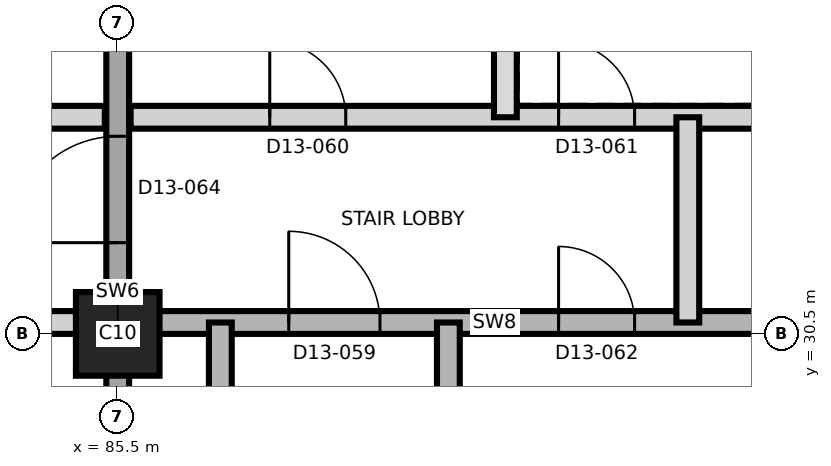
"""IFC4 building model, lengths in metres.
Left out: names, types, materials, properties, quantities, classifications, styles, units other than length and angle.
Written with IfcOpenShell. Run it as: python <this file> out.ifc"""

import sys

from ifc_helpers import new_model, si_unit, direction, frame, frame_2d, origin, origin_2d, place, context, subcontext, project, spatial, rectangle, extrude, element, fill, save


model = new_model("IFC4")
c1 = context("Model", 3, precision=1e-05, world=origin(), true_north=direction((0.0, 1.0)))
c2 = subcontext(c1, "Body", "Model", "MODEL_VIEW")
j1 = project(units=[si_unit("LENGTHUNIT", "METRE"), si_unit("PLANEANGLEUNIT", "RADIAN")], contexts=[c1])
p1 = place(None, origin())
s1 = spatial("IfcSite", under=j1, at=p1, CompositionType="ELEMENT")
p2 = place(p1, origin())
s2 = spatial("IfcBuilding", under=s1, at=p2, CompositionType="ELEMENT")
p3 = place(p2, frame((0.0, 0.0, 145.9)))
s3 = spatial("IfcBuildingStorey", under=s2, at=p3, CompositionType="ELEMENT", Elevation=145.9)
p4 = place(p3, frame((85.5, 30.5, 0.0), z_axis=(0.0, 0.0, 1.0), x_axis=(1.0, 0.0, 0.0)))
e1 = element("IfcColumn", 1, at=p4, inside=s3, PredefinedType="COLUMN", context=c2, shape_type="SweptSolid", body=[
    extrude(rectangle(XDim=1.1, YDim=1.1, at=origin_2d()), origin(), (0.0, 0.0, 1.0), 3.7),
])
p5 = place(p3, frame((85.5, 20.35, 0.0), z_axis=(0.0, 0.0, 1.0), x_axis=(0.0, 1.0, 0.0)))
e2 = element("IfcWall", 2, at=p5, inside=s3, PredefinedType="SHEAR", context=c2, shape_type="SweptSolid", body=[
    extrude(rectangle(XDim=20.3, YDim=0.3, at=frame_2d((10.15, 0.0))), origin(), (0.0, 0.0, 1.0), 3.7),
])
p6 = place(p5, frame((11.35, 0.0, 0.0)))
e3 = element("IfcOpeningElement", 3, at=p6, cuts=e2, PredefinedType="OPENING", context=c2, shape_type="SweptSolid", body=[
    extrude(rectangle(XDim=1.4, YDim=2.1, at=frame_2d((0.7, 1.05))), frame((0.0, 0.16, 0.0), z_axis=(0.0, -1.0, 0.0), x_axis=(1.0, 0.0, 0.0)), (0.0, 0.0, 1.0), 0.32),
])
p7 = place(p3, frame((58.65, 30.65, 0.0), z_axis=(0.0, 0.0, 1.0), x_axis=(1.0, 0.0, 0.0)))
e4 = element("IfcWall", 4, at=p7, inside=s3, PredefinedType="PARTITIONING", context=c2, shape_type="SweptSolid", body=[
    extrude(rectangle(XDim=26.68, YDim=0.3, at=frame_2d((13.34, 0.0))), origin(), (0.0, 0.0, 1.0), 3.3),
])
p8 = place(p7, frame((2.2, 0.0, 0.0)))
e5 = element("IfcOpeningElement", 5, at=p8, cuts=e4, PredefinedType="OPENING", context=c2, shape_type="SweptSolid", body=[
    extrude(rectangle(XDim=1.0, YDim=2.4, at=frame_2d((0.5, 1.2))), frame((0.0, 0.16, 0.0), z_axis=(0.0, -1.0, 0.0), x_axis=(1.0, 0.0, 0.0)), (0.0, 0.0, 1.0), 0.32),
])
p9 = place(p7, frame((12.85, 0.0, 0.0)))
e6 = element("IfcOpeningElement", 6, at=p9, cuts=e4, PredefinedType="OPENING", context=c2, shape_type="SweptSolid", body=[
    extrude(rectangle(XDim=1.0, YDim=2.4, at=frame_2d((0.5, 1.2))), frame((0.0, 0.16, 0.0), z_axis=(0.0, -1.0, 0.0), x_axis=(1.0, 0.0, 0.0)), (0.0, 0.0, 1.0), 0.32),
])
p10 = place(p7, frame((20.77, 0.0, 0.0)))
e7 = element("IfcOpeningElement", 7, at=p10, cuts=e4, PredefinedType="OPENING", context=c2, shape_type="SweptSolid", body=[
    extrude(rectangle(XDim=1.0, YDim=2.1, at=frame_2d((0.5, 1.05))), frame((0.0, 0.16, 0.0), z_axis=(0.0, -1.0, 0.0), x_axis=(1.0, 0.0, 0.0)), (0.0, 0.0, 1.0), 0.32),
])
p11 = place(p7, frame((22.57, 0.0, 0.0)))
e8 = element("IfcOpeningElement", 8, at=p11, cuts=e4, PredefinedType="OPENING", context=c2, shape_type="SweptSolid", body=[
    extrude(rectangle(XDim=1.0, YDim=2.1, at=frame_2d((0.5, 1.05))), frame((0.0, 0.16, 0.0), z_axis=(0.0, -1.0, 0.0), x_axis=(1.0, 0.0, 0.0)), (0.0, 0.0, 1.0), 0.32),
])
p12 = place(p3, frame((85.67, 30.65, 0.0), z_axis=(0.0, 0.0, 1.0), x_axis=(1.0, 0.0, 0.0)))
e9 = element("IfcWall", 9, at=p12, inside=s3, PredefinedType="SHEAR", context=c2, shape_type="SweptSolid", body=[
    extrude(rectangle(XDim=9.58, YDim=0.3, at=frame_2d((4.79, 0.0))), origin(), (0.0, 0.0, 1.0), 3.4),
])
p13 = place(p12, frame((2.08, 0.0, 0.0)))
e10 = element("IfcOpeningElement", 10, at=p13, cuts=e9, PredefinedType="OPENING", context=c2, shape_type="SweptSolid", body=[
    extrude(rectangle(XDim=1.2, YDim=2.1, at=frame_2d((0.6, 1.05))), frame((0.0, 0.16, 0.0), z_axis=(0.0, -1.0, 0.0), x_axis=(1.0, 0.0, 0.0)), (0.0, 0.0, 1.0), 0.32),
])
p14 = place(p12, frame((5.63, 0.0, 0.0)))
e11 = element("IfcOpeningElement", 11, at=p14, cuts=e9, PredefinedType="OPENING", context=c2, shape_type="SweptSolid", body=[
    extrude(rectangle(XDim=1.0, YDim=2.1, at=frame_2d((0.5, 1.05))), frame((0.0, 0.16, 0.0), z_axis=(0.0, -1.0, 0.0), x_axis=(1.0, 0.0, 0.0)), (0.0, 0.0, 1.0), 0.32),
])
p15 = place(p3, frame((58.65, 33.35, 0.0), z_axis=(0.0, 0.0, 1.0), x_axis=(1.0, 0.0, 0.0)))
e12 = element("IfcWall", 12, at=p15, inside=s3, PredefinedType="PARTITIONING", context=c2, shape_type="SweptSolid", body=[
    extrude(rectangle(XDim=26.68, YDim=0.3, at=frame_2d((13.34, 0.0))), origin(), (0.0, 0.0, 1.0), 3.3),
])
p16 = place(p15, frame((0.985, 0.0, 0.0)))
e13 = element("IfcOpeningElement", 13, at=p16, cuts=e12, PredefinedType="OPENING", context=c2, shape_type="SweptSolid", body=[
    extrude(rectangle(XDim=1.2, YDim=2.1, at=frame_2d((0.6, 1.05))), frame((0.0, 0.16, 0.0), z_axis=(0.0, -1.0, 0.0), x_axis=(1.0, 0.0, 0.0)), (0.0, 0.0, 1.0), 0.32),
])
p17 = place(p15, frame((4.235, 0.0, 0.0)))
e14 = element("IfcOpeningElement", 14, at=p17, cuts=e12, PredefinedType="OPENING", context=c2, shape_type="SweptSolid", body=[
    extrude(rectangle(XDim=1.0, YDim=2.1, at=frame_2d((0.5, 1.05))), frame((0.0, 0.16, 0.0), z_axis=(0.0, -1.0, 0.0), x_axis=(1.0, 0.0, 0.0)), (0.0, 0.0, 1.0), 0.32),
])
p18 = place(p15, frame((12.265, 0.0, 0.0)))
e15 = element("IfcOpeningElement", 15, at=p18, cuts=e12, PredefinedType="OPENING", context=c2, shape_type="SweptSolid", body=[
    extrude(rectangle(XDim=1.0, YDim=2.1, at=frame_2d((0.5, 1.05))), frame((0.0, 0.16, 0.0), z_axis=(0.0, -1.0, 0.0), x_axis=(1.0, 0.0, 0.0)), (0.0, 0.0, 1.0), 0.32),
])
p19 = place(p15, frame((15.215, 0.0, 0.0)))
e16 = element("IfcOpeningElement", 16, at=p19, cuts=e12, PredefinedType="OPENING", context=c2, shape_type="SweptSolid", body=[
    extrude(rectangle(XDim=1.4, YDim=2.1, at=frame_2d((0.7, 1.05))), frame((0.0, 0.16, 0.0), z_axis=(0.0, -1.0, 0.0), x_axis=(1.0, 0.0, 0.0)), (0.0, 0.0, 1.0), 0.32),
])
p20 = place(p15, frame((20.2, 0.0, 0.0)))
e17 = element("IfcOpeningElement", 17, at=p20, cuts=e12, PredefinedType="OPENING", context=c2, shape_type="SweptSolid", body=[
    extrude(rectangle(XDim=1.0, YDim=2.4, at=frame_2d((0.5, 1.2))), frame((0.0, 0.16, 0.0), z_axis=(0.0, -1.0, 0.0), x_axis=(1.0, 0.0, 0.0)), (0.0, 0.0, 1.0), 0.32),
])
p21 = place(p3, frame((85.67, 33.35, 0.0), z_axis=(0.0, 0.0, 1.0), x_axis=(1.0, 0.0, 0.0)))
e18 = element("IfcWall", 18, at=p21, inside=s3, PredefinedType="PARTITIONING", context=c2, shape_type="SweptSolid", body=[
    extrude(rectangle(XDim=9.58, YDim=0.3, at=frame_2d((4.79, 0.0))), origin(), (0.0, 0.0, 1.0), 3.3),
])
p22 = place(p21, frame((1.83, 0.0, 0.0)))
e19 = element("IfcOpeningElement", 19, at=p22, cuts=e18, PredefinedType="OPENING", context=c2, shape_type="SweptSolid", body=[
    extrude(rectangle(XDim=1.0, YDim=2.1, at=frame_2d((0.5, 1.05))), frame((0.0, 0.16, 0.0), z_axis=(0.0, -1.0, 0.0), x_axis=(1.0, 0.0, 0.0)), (0.0, 0.0, 1.0), 0.32),
])
p23 = place(p21, frame((5.63, 0.0, 0.0)))
e20 = element("IfcOpeningElement", 20, at=p23, cuts=e18, PredefinedType="OPENING", context=c2, shape_type="SweptSolid", body=[
    extrude(rectangle(XDim=1.0, YDim=2.1, at=frame_2d((0.5, 1.05))), frame((0.0, 0.16, 0.0), z_axis=(0.0, -1.0, 0.0), x_axis=(1.0, 0.0, 0.0)), (0.0, 0.0, 1.0), 0.32),
])
for number, where, z_axis, x_axis in (
    (21, (86.85, 21.8, 0.0), (0.0, 0.0, 1.0), (0.0, 1.0, 0.0)),
    (22, (89.85, 21.8, 0.0), (0.0, 0.0, 1.0), (0.0, 1.0, 0.0)),
):
    element("IfcWall", number, at=place(p3, frame(where, z_axis=z_axis, x_axis=x_axis)), inside=s3, PredefinedType="SHEAR", context=c2, shape_type="SweptSolid", body=[
        extrude(rectangle(XDim=8.85, YDim=0.3, at=frame_2d((4.425, 0.0))), origin(), (0.0, 0.0, 1.0), 3.4),
    ])
p24 = place(p3, frame((90.6, 33.35, 0.0), z_axis=(0.0, 0.0, 1.0), x_axis=(0.0, 1.0, 0.0)))
e23 = element("IfcWall", 23, at=p24, inside=s3, PredefinedType="PARTITIONING", context=c2, shape_type="SweptSolid", body=[
    extrude(rectangle(XDim=6.898, YDim=0.3, at=frame_2d((3.449, 0.0))), origin(), (0.0, 0.0, 1.0), 3.4),
])
p25 = place(p3, frame((93.0, 30.65, 0.0), z_axis=(0.0, 0.0, 1.0), x_axis=(0.0, 1.0, 0.0)))
e24 = element("IfcWall", 24, at=p25, inside=s3, PredefinedType="PARTITIONING", context=c2, shape_type="SweptSolid", body=[
    extrude(rectangle(XDim=2.7, YDim=0.3, at=frame_2d((1.35, 0.0))), origin(), (0.0, 0.0, 1.0), 3.4),
])
p26 = place(p13, origin())
e25 = element("IfcDoor", 25, at=p26, inside=s3, OperationType="SINGLE_SWING_LEFT", PredefinedType="DOOR", context=c2, shape_type="SweptSolid", body=[
    extrude(rectangle(XDim=1.2, YDim=2.1, at=frame_2d((0.6, 1.05))), frame((0.0, 0.025, 0.0), z_axis=(0.0, -1.0, 0.0), x_axis=(1.0, 0.0, 0.0)), (0.0, 0.0, 1.0), 0.05),
])
fill(e10, e25)
p27 = place(p22, origin())
e26 = element("IfcDoor", 26, at=p27, inside=s3, OperationType="SINGLE_SWING_LEFT", PredefinedType="DOOR", context=c2, shape_type="SweptSolid", body=[
    extrude(rectangle(XDim=1.0, YDim=2.1, at=frame_2d((0.5, 1.05))), frame((0.0, 0.025, 0.0), z_axis=(0.0, -1.0, 0.0), x_axis=(1.0, 0.0, 0.0)), (0.0, 0.0, 1.0), 0.05),
])
fill(e19, e26)
p28 = place(p23, origin())
e27 = element("IfcDoor", 27, at=p28, inside=s3, OperationType="SINGLE_SWING_RIGHT", PredefinedType="DOOR", context=c2, shape_type="SweptSolid", body=[
    extrude(rectangle(XDim=1.0, YDim=2.1, at=frame_2d((0.5, 1.05))), frame((0.0, 0.025, 0.0), z_axis=(0.0, -1.0, 0.0), x_axis=(1.0, 0.0, 0.0)), (0.0, 0.0, 1.0), 0.05),
])
fill(e20, e27)
p29 = place(p14, origin())
e28 = element("IfcDoor", 28, at=p29, inside=s3, OperationType="SINGLE_SWING_LEFT", PredefinedType="DOOR", context=c2, shape_type="SweptSolid", body=[
    extrude(rectangle(XDim=1.0, YDim=2.1, at=frame_2d((0.5, 1.05))), frame((0.0, 0.025, 0.0), z_axis=(0.0, -1.0, 0.0), x_axis=(1.0, 0.0, 0.0)), (0.0, 0.0, 1.0), 0.05),
])
fill(e11, e28)
p30 = place(p6, origin())
e29 = element("IfcDoor", 29, at=p30, inside=s3, OperationType="SINGLE_SWING_RIGHT", PredefinedType="DOOR", context=c2, shape_type="SweptSolid", body=[
    extrude(rectangle(XDim=1.4, YDim=2.1, at=frame_2d((0.7, 1.05))), frame((0.0, 0.025, 0.0), z_axis=(0.0, -1.0, 0.0), x_axis=(1.0, 0.0, 0.0)), (0.0, 0.0, 1.0), 0.05),
])
fill(e3, e29)
save(model, sys.argv[1])
